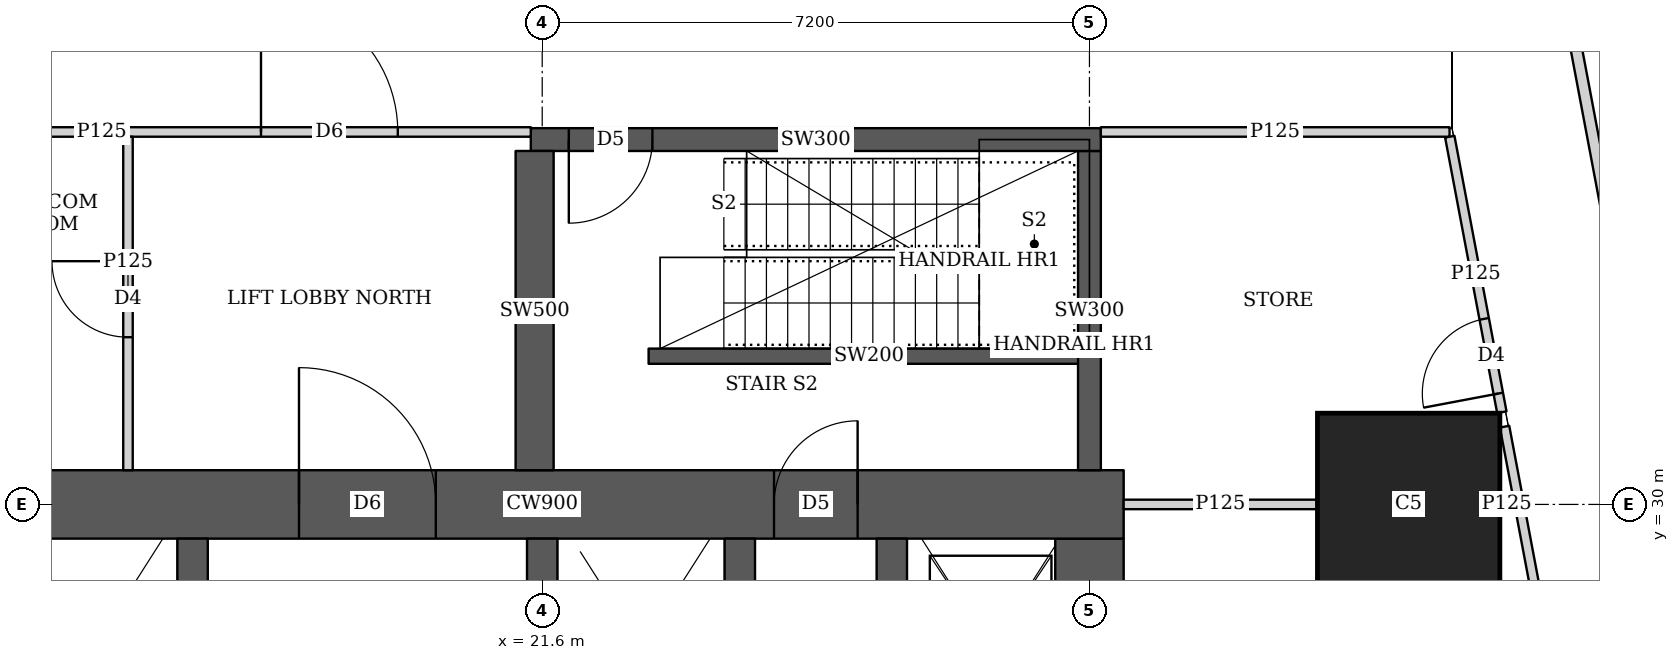
"""IFC4 building model, lengths in metres.
Left out: names, types, materials, properties, quantities, classifications, styles, units other than length and angle.
Written with IfcOpenShell. Run it as: python <this file> out.ifc"""

import sys

from ifc_helpers import new_model, si_unit, direction, frame, frame_2d, origin, origin_2d, place, context, subcontext, project, spatial, rectangle, extrude, element, fill, save


model = new_model("IFC4")
c1 = context("Model", 3, precision=1e-05, world=origin(), true_north=direction((0.0, 1.0)))
c2 = subcontext(c1, "Body", "Model", "MODEL_VIEW")
j1 = project(units=[si_unit("LENGTHUNIT", "METRE"), si_unit("PLANEANGLEUNIT", "RADIAN")], contexts=[c1])
p1 = place(None, origin())
s1 = spatial("IfcSite", under=j1, at=p1, CompositionType="ELEMENT")
p2 = place(p1, origin())
s2 = spatial("IfcBuilding", under=s1, at=p2, CompositionType="ELEMENT")
p3 = place(p2, frame((0.0, 0.0, 5.6)))
s3 = spatial("IfcBuildingStorey", under=s2, at=p3, CompositionType="ELEMENT", Elevation=5.6)
p4 = place(p3, frame((33.0, 30.0, 0.0), z_axis=(0.0, 0.0, 1.0), x_axis=(1.0, 0.0, 0.0)))
e1 = element("IfcColumn", 1, at=p4, inside=s3, PredefinedType="COLUMN", context=c2, shape_type="SweptSolid", body=[
    extrude(rectangle(XDim=2.4, YDim=2.4, at=origin_2d()), origin(), (0.0, 0.0, 1.0), 4.5),
])
p5 = place(p3, frame((13.95, 30.0, 0.0), z_axis=(0.0, 0.0, 1.0), x_axis=(1.0, 0.0, 0.0)))
e2 = element("IfcWall", 2, at=p5, inside=s3, PredefinedType="SHEAR", context=c2, shape_type="SweptSolid", body=[
    extrude(rectangle(XDim=15.3, YDim=0.9, at=frame_2d((7.65, 0.0))), origin(), (0.0, 0.0, 1.0), 4.5),
])
p6 = place(p5, frame((4.45, 0.0, 0.0)))
e3 = element("IfcOpeningElement", 3, at=p6, cuts=e2, PredefinedType="OPENING", context=c2, shape_type="SweptSolid", body=[
    extrude(rectangle(XDim=1.8, YDim=2.1, at=frame_2d((0.9, 1.05))), frame((0.0, 0.46, 0.0), z_axis=(0.0, -1.0, 0.0), x_axis=(1.0, 0.0, 0.0)), (0.0, 0.0, 1.0), 0.92),
])
p7 = place(p5, frame((10.7, 0.0, 0.0)))
e4 = element("IfcOpeningElement", 4, at=p7, cuts=e2, PredefinedType="OPENING", context=c2, shape_type="SweptSolid", body=[
    extrude(rectangle(XDim=1.1, YDim=2.1, at=frame_2d((0.55, 1.05))), frame((0.0, 0.46, 0.0), z_axis=(0.0, -1.0, 0.0), x_axis=(1.0, 0.0, 0.0)), (0.0, 0.0, 1.0), 0.92),
])
p8 = place(p3, frame((28.8, 15.45, 0.0), z_axis=(0.0, 0.0, 1.0), x_axis=(0.0, 1.0, 0.0)))
e5 = element("IfcWall", 5, at=p8, inside=s3, PredefinedType="SHEAR", context=c2, shape_type="SweptSolid", body=[
    extrude(rectangle(XDim=14.1, YDim=0.9, at=frame_2d((7.05, 0.0))), origin(), (0.0, 0.0, 1.0), 4.5),
])
for number, where, z_axis, x_axis in (
    (6, (17.0, 15.45, 0.0), (0.0, 0.0, 1.0), (0.0, 1.0, 0.0)),
    (7, (21.6, 15.45, 0.0), (0.0, 0.0, 1.0), (0.0, 1.0, 0.0)),
    (8, (24.2, 15.45, 0.0), (0.0, 0.0, 1.0), (0.0, 1.0, 0.0)),
):
    element("IfcWall", number, at=place(p3, frame(where, z_axis=z_axis, x_axis=x_axis)), inside=s3, PredefinedType="SHEAR", context=c2, shape_type="SweptSolid", body=[
        extrude(rectangle(XDim=14.1, YDim=0.4, at=frame_2d((7.05, 0.0))), origin(), (0.0, 0.0, 1.0), 4.5),
    ])
p9 = place(p3, frame((26.2, 26.45, 0.0), z_axis=(0.0, 0.0, 1.0), x_axis=(0.0, 1.0, 0.0)))
e9 = element("IfcWall", 9, at=p9, inside=s3, PredefinedType="SHEAR", context=c2, shape_type="SweptSolid", body=[
    extrude(rectangle(XDim=3.1, YDim=0.4, at=frame_2d((1.55, 0.0))), origin(), (0.0, 0.0, 1.0), 4.5),
])
p10 = place(p9, frame((1.075, 0.0, 0.0)))
e10 = element("IfcOpeningElement", 10, at=p10, cuts=e9, PredefinedType="OPENING", context=c2, shape_type="SweptSolid", body=[
    extrude(rectangle(XDim=1.2, YDim=2.1, at=frame_2d((0.6, 1.05))), frame((0.0, 0.21, 0.0), z_axis=(0.0, -1.0, 0.0), x_axis=(1.0, 0.0, 0.0)), (0.0, 0.0, 1.0), 0.42),
])
p11 = place(p3, frame((21.45, 34.8, 0.0), z_axis=(0.0, 0.0, 1.0), x_axis=(1.0, 0.0, 0.0)))
e11 = element("IfcWall", 11, at=p11, inside=s3, PredefinedType="SHEAR", context=c2, shape_type="SweptSolid", body=[
    extrude(rectangle(XDim=7.5, YDim=0.3, at=frame_2d((3.75, 0.0))), origin(), (0.0, 0.0, 1.0), 4.5),
])
p12 = place(p11, frame((0.5, 0.0, 0.0)))
e12 = element("IfcOpeningElement", 12, at=p12, cuts=e11, PredefinedType="OPENING", context=c2, shape_type="SweptSolid", body=[
    extrude(rectangle(XDim=1.1, YDim=2.1, at=frame_2d((0.55, 1.05))), frame((0.0, 0.16, 0.0), z_axis=(0.0, -1.0, 0.0), x_axis=(1.0, 0.0, 0.0)), (0.0, 0.0, 1.0), 0.32),
])
p13 = place(p3, frame((21.5, 30.45, 0.0), z_axis=(0.0, 0.0, 1.0), x_axis=(0.0, 1.0, 0.0)))
e13 = element("IfcWall", 13, at=p13, inside=s3, PredefinedType="SHEAR", context=c2, shape_type="SweptSolid", body=[
    extrude(rectangle(XDim=4.2, YDim=0.5, at=frame_2d((2.1, 0.0))), origin(), (0.0, 0.0, 1.0), 4.5),
])
p14 = place(p3, frame((28.8, 30.45, 0.0), z_axis=(0.0, 0.0, 1.0), x_axis=(0.0, 1.0, 0.0)))
e14 = element("IfcWall", 14, at=p14, inside=s3, PredefinedType="SHEAR", context=c2, shape_type="SweptSolid", body=[
    extrude(rectangle(XDim=4.2, YDim=0.3, at=frame_2d((2.1, 0.0))), origin(), (0.0, 0.0, 1.0), 4.5),
])
p15 = place(p3, frame((35.151, 36.285, 0.0), z_axis=(0.0, 0.0, 1.0), x_axis=(0.18558085056, -0.982628998099, 0.0)))
e15 = element("IfcWall", 15, at=p15, inside=s3, PredefinedType="SOLIDWALL", context=c2, shape_type="SweptSolid", body=[
    extrude(rectangle(XDim=34.352, YDim=0.15, at=frame_2d((17.176, 0.0))), origin(), (0.0, 0.0, 1.0), 2.4),
])
p16 = place(p15, frame((13.189, 0.0, 0.0)))
e16 = element("IfcOpeningElement", 16, at=p16, cuts=e15, PredefinedType="OPENING", context=c2, shape_type="SweptSolid", body=[
    extrude(rectangle(XDim=1.3, YDim=2.1, at=frame_2d((0.65, 1.05))), frame((0.0, 0.085, 0.0), z_axis=(0.0, -1.0, 0.0), x_axis=(1.0, 0.0, 0.0)), (0.0, 0.0, 1.0), 0.17),
])
p17 = place(p15, frame((19.443, 0.0, 0.0)))
e17 = element("IfcOpeningElement", 17, at=p17, cuts=e15, PredefinedType="OPENING", context=c2, shape_type="SweptSolid", body=[
    extrude(rectangle(XDim=1.3, YDim=2.1, at=frame_2d((0.65, 1.05))), frame((0.0, 0.085, 0.0), z_axis=(0.0, -1.0, 0.0), x_axis=(1.0, 0.0, 0.0)), (0.0, 0.0, 1.0), 0.17),
])
p18 = place(p15, frame((25.444, 0.0, 0.0)))
e18 = element("IfcOpeningElement", 18, at=p18, cuts=e15, PredefinedType="OPENING", context=c2, shape_type="SweptSolid", body=[
    extrude(rectangle(XDim=1.3, YDim=2.1, at=frame_2d((0.65, 1.05))), frame((0.0, 0.085, 0.0), z_axis=(0.0, -1.0, 0.0), x_axis=(1.0, 0.0, 0.0)), (0.0, 0.0, 1.0), 0.17),
])
p19 = place(p3, frame((10.163, 34.9, 0.0), z_axis=(0.0, 0.0, 1.0), x_axis=(1.0, 0.0, 0.0)))
e19 = element("IfcWall", 19, at=p19, inside=s3, PredefinedType="PARTITIONING", context=c2, shape_type="SweptSolid", body=[
    extrude(rectangle(XDim=11.287, YDim=0.125, at=frame_2d((5.644, 0.0))), origin(), (0.0, 0.0, 1.0), 2.2),
])
p20 = place(p19, frame((7.737, 0.0, 0.0)))
e20 = element("IfcOpeningElement", 20, at=p20, cuts=e19, PredefinedType="OPENING", context=c2, shape_type="SweptSolid", body=[
    extrude(rectangle(XDim=1.8, YDim=2.1, at=frame_2d((0.9, 1.05))), frame((0.0, 0.073, 0.0), z_axis=(0.0, -1.0, 0.0), x_axis=(1.0, 0.0, 0.0)), (0.0, 0.0, 1.0), 0.145),
])
p21 = place(p3, frame((16.15, 30.45, 0.0), z_axis=(0.0, 0.0, 1.0), x_axis=(0.0, 1.0, 0.0)))
e21 = element("IfcWall", 21, at=p21, inside=s3, PredefinedType="PARTITIONING", context=c2, shape_type="SweptSolid", body=[
    extrude(rectangle(XDim=4.387, YDim=0.125, at=frame_2d((2.193, 0.0))), origin(), (0.0, 0.0, 1.0), 4.2),
])
p22 = place(p21, frame((1.75, 0.0, 0.0)))
e22 = element("IfcOpeningElement", 22, at=p22, cuts=e21, PredefinedType="OPENING", context=c2, shape_type="SweptSolid", body=[
    extrude(rectangle(XDim=1.0, YDim=2.1, at=frame_2d((0.5, 1.05))), frame((0.0, 0.073, 0.0), z_axis=(0.0, -1.0, 0.0), x_axis=(1.0, 0.0, 0.0)), (0.0, 0.0, 1.0), 0.145),
])
p23 = place(p3, frame((28.95, 34.9, 0.0), z_axis=(0.0, 0.0, 1.0), x_axis=(1.0, 0.0, 0.0)))
e23 = element("IfcWall", 23, at=p23, inside=s3, PredefinedType="PARTITIONING", context=c2, shape_type="SweptSolid", body=[
    extrude(rectangle(XDim=4.588, YDim=0.125, at=frame_2d((2.294, 0.0))), origin(), (0.0, 0.0, 1.0), 2.2),
])
p24 = place(p3, frame((37.059, 16.213, 0.0), z_axis=(0.0, 0.0, 1.0), x_axis=(-0.185585225745, 0.982628171785, 0.0)))
e24 = element("IfcWall", 24, at=p24, inside=s3, PredefinedType="PARTITIONING", context=c2, shape_type="SweptSolid", body=[
    extrude(rectangle(XDim=15.072, YDim=0.125, at=frame_2d((7.536, 0.0))), origin(), (0.0, 0.0, 1.0), 2.6),
])
p25 = place(p24, frame((7.221, 0.0, 0.0)))
e25 = element("IfcOpeningElement", 25, at=p25, cuts=e24, PredefinedType="OPENING", context=c2, shape_type="SweptSolid", body=[
    extrude(rectangle(XDim=1.0, YDim=2.1, at=frame_2d((0.5, 1.05))), frame((0.0, 0.073, 0.0), z_axis=(0.0, -1.0, 0.0), x_axis=(1.0, 0.0, 0.0)), (0.0, 0.0, 1.0), 0.145),
])
p26 = place(p24, frame((0.25, 0.0, 0.0)))
e26 = element("IfcOpeningElement", 26, at=p26, cuts=e24, PredefinedType="OPENING", context=c2, shape_type="SweptSolid", body=[
    extrude(rectangle(XDim=1.0, YDim=2.1, at=frame_2d((0.5, 1.05))), frame((0.0, 0.073, 0.0), z_axis=(0.0, -1.0, 0.0), x_axis=(1.0, 0.0, 0.0)), (0.0, 0.0, 1.0), 0.145),
])
p27 = place(p24, frame((3.99, 0.0, 0.0)))
e27 = element("IfcOpeningElement", 27, at=p27, cuts=e24, PredefinedType="OPENING", context=c2, shape_type="SweptSolid", body=[
    extrude(rectangle(XDim=1.0, YDim=2.1, at=frame_2d((0.5, 1.05))), frame((0.0, 0.073, 0.0), z_axis=(0.0, -1.0, 0.0), x_axis=(1.0, 0.0, 0.0)), (0.0, 0.0, 1.0), 0.145),
])
p28 = place(p3, frame((34.226, 31.213, 0.0), z_axis=(0.0, 0.0, 1.0), x_axis=(-0.185694811189, 0.982607468472, 0.0)))
e28 = element("IfcWall", 28, at=p28, inside=s3, PredefinedType="PARTITIONING", context=c2, shape_type="SweptSolid", body=[
    extrude(rectangle(XDim=3.689, YDim=0.125, at=frame_2d((1.845, 0.0))), origin(), (0.0, 0.0, 1.0), 4.2),
])
p29 = place(p28, frame((0.25, 0.0, 0.0)))
e29 = element("IfcOpeningElement", 29, at=p29, cuts=e28, PredefinedType="OPENING", context=c2, shape_type="SweptSolid", body=[
    extrude(rectangle(XDim=1.0, YDim=2.1, at=frame_2d((0.5, 1.05))), frame((0.0, 0.073, 0.0), z_axis=(0.0, -1.0, 0.0), x_axis=(1.0, 0.0, 0.0)), (0.0, 0.0, 1.0), 0.145),
])
p30 = place(p3, frame((29.25, 30.0, 0.0), z_axis=(0.0, 0.0, 1.0), x_axis=(1.0, 0.0, 0.0)))
e30 = element("IfcWall", 30, at=p30, inside=s3, PredefinedType="PARTITIONING", context=c2, shape_type="SweptSolid", body=[
    extrude(rectangle(XDim=2.549, YDim=0.125, at=frame_2d((1.274, 0.0))), origin(), (0.0, 0.0, 1.0), 4.2),
])
p31 = place(p3, frame((34.201, 30.0, 0.0), z_axis=(0.0, 0.0, 1.0), x_axis=(1.0, 0.0, 0.0)))
e31 = element("IfcWall", 31, at=p31, inside=s3, PredefinedType="PARTITIONING", context=c2, shape_type="SweptSolid", body=[
    extrude(rectangle(XDim=0.178, YDim=0.125, at=frame_2d((0.089, 0.0))), origin(), (0.0, 0.0, 1.0), 2.6),
])
p32 = place(p3, frame((23.0, 31.95, 0.0), z_axis=(0.0, 0.0, 1.0), x_axis=(1.0, 0.0, 0.0)))
e32 = element("IfcWall", 32, at=p32, inside=s3, PredefinedType="SHEAR", context=c2, shape_type="SweptSolid", body=[
    extrude(rectangle(XDim=5.8, YDim=0.2, at=frame_2d((2.9, 0.0))), origin(), (0.0, 0.0, 1.0), 4.5),
])
p33 = place(p22, origin())
e33 = element("IfcDoor", 33, at=p33, inside=s3, OperationType="SINGLE_SWING_RIGHT", PredefinedType="DOOR", context=c2, shape_type="SweptSolid", body=[
    extrude(rectangle(XDim=1.0, YDim=2.1, at=frame_2d((0.5, 1.05))), frame((0.0, 0.025, 0.0), z_axis=(0.0, -1.0, 0.0), x_axis=(1.0, 0.0, 0.0)), (0.0, 0.0, 1.0), 0.05),
])
fill(e22, e33)
p34 = place(p20, origin())
e34 = element("IfcDoor", 34, at=p34, inside=s3, OperationType="DOUBLE_DOOR_SINGLE_SWING", PredefinedType="DOOR", context=c2, shape_type="SweptSolid", body=[
    extrude(rectangle(XDim=1.8, YDim=2.1, at=frame_2d((0.9, 1.05))), frame((0.0, 0.025, 0.0), z_axis=(0.0, -1.0, 0.0), x_axis=(1.0, 0.0, 0.0)), (0.0, 0.0, 1.0), 0.05),
])
fill(e20, e34)
p35 = place(p29, origin())
e35 = element("IfcDoor", 35, at=p35, inside=s3, OperationType="SINGLE_SWING_LEFT", PredefinedType="DOOR", context=c2, shape_type="SweptSolid", body=[
    extrude(rectangle(XDim=1.0, YDim=2.1, at=frame_2d((0.5, 1.05))), frame((0.0, 0.025, 0.0), z_axis=(0.0, -1.0, 0.0), x_axis=(1.0, 0.0, 0.0)), (0.0, 0.0, 1.0), 0.05),
])
fill(e29, e35)
p36 = place(p6, origin())
e36 = element("IfcDoor", 36, at=p36, inside=s3, OperationType="DOUBLE_DOOR_SINGLE_SWING", PredefinedType="DOOR", context=c2, shape_type="SweptSolid", body=[
    extrude(rectangle(XDim=1.8, YDim=2.1, at=frame_2d((0.9, 1.05))), frame((0.0, 0.025, 0.0), z_axis=(0.0, -1.0, 0.0), x_axis=(1.0, 0.0, 0.0)), (0.0, 0.0, 1.0), 0.05),
])
fill(e3, e36)
p37 = place(p7, origin())
e37 = element("IfcDoor", 37, at=p37, inside=s3, OperationType="SINGLE_SWING_RIGHT", PredefinedType="DOOR", context=c2, shape_type="SweptSolid", body=[
    extrude(rectangle(XDim=1.1, YDim=2.1, at=frame_2d((0.55, 1.05))), frame((0.0, 0.025, 0.0), z_axis=(0.0, -1.0, 0.0), x_axis=(1.0, 0.0, 0.0)), (0.0, 0.0, 1.0), 0.05),
])
fill(e4, e37)
p38 = place(p12, origin())
e38 = element("IfcDoor", 38, at=p38, inside=s3, OperationType="SINGLE_SWING_RIGHT", PredefinedType="DOOR", context=c2, shape_type="SweptSolid", body=[
    extrude(rectangle(XDim=1.1, YDim=2.1, at=frame_2d((0.55, 1.05))), frame((0.0, 0.025, 0.0), z_axis=(0.0, -1.0, 0.0), x_axis=(1.0, 0.0, 0.0)), (0.0, 0.0, 1.0), 0.05),
])
fill(e12, e38)
save(model, sys.argv[1])
